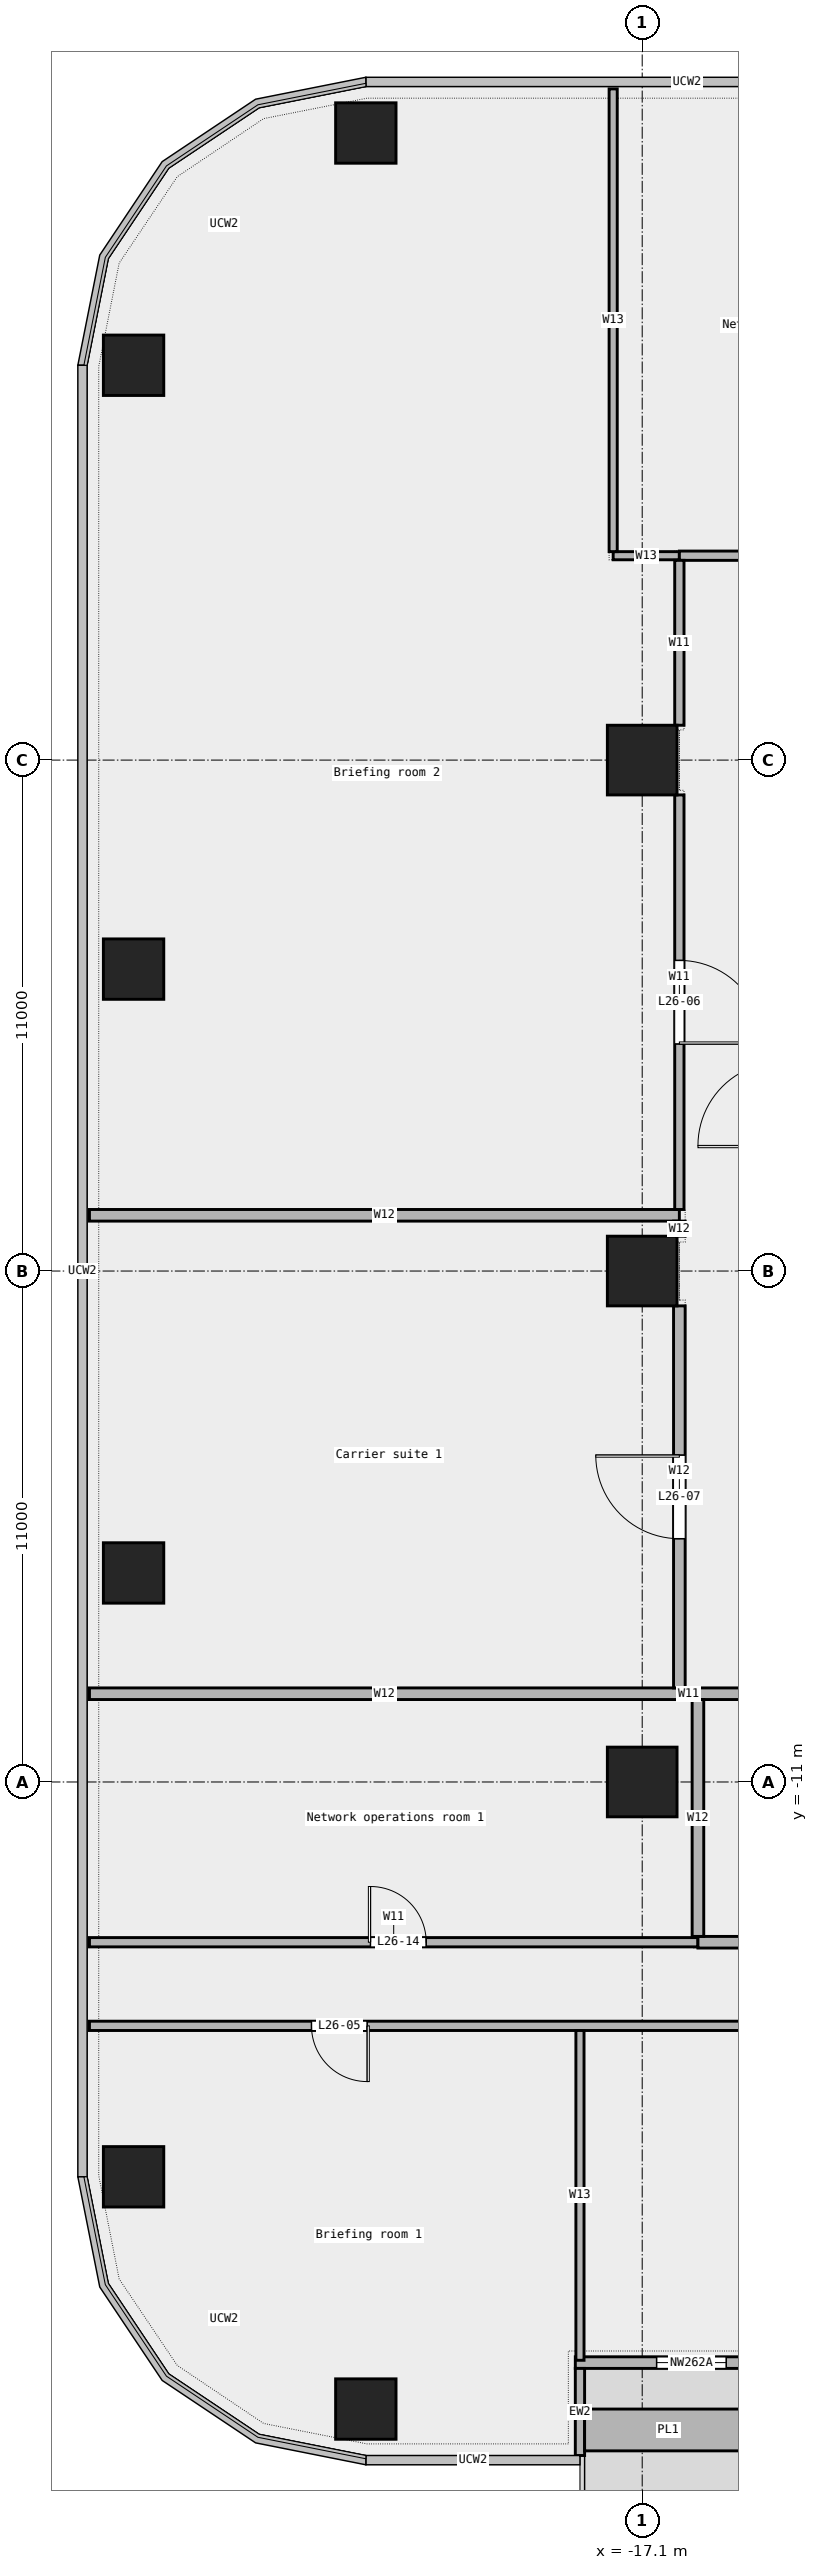
"""IFC4 building model, lengths in metres.
Left out: names, types, materials, properties, quantities, classifications, styles, units other than length and angle.
Written with IfcOpenShell. Run it as: python <this file> out.ifc"""

import sys

from ifc_helpers import new_model, si_unit, direction, frame, frame_2d, origin, origin_2d, place, context, subcontext, project, spatial, rectangle, extrude, element, fill, save


model = new_model("IFC4")
c1 = context("Model", 3, precision=1e-05, world=origin(), true_north=direction((0.0, 1.0)))
c2 = subcontext(c1, "Body", "Model", "MODEL_VIEW")
j1 = project(units=[si_unit("LENGTHUNIT", "METRE"), si_unit("PLANEANGLEUNIT", "RADIAN")], contexts=[c1])
p1 = place(None, origin())
s1 = spatial("IfcSite", under=j1, at=p1, CompositionType="ELEMENT")
p2 = place(p1, origin())
s2 = spatial("IfcBuilding", under=s1, at=p2, CompositionType="ELEMENT")
p3 = place(p2, frame((0.0, 0.0, 130.6)))
s3 = spatial("IfcBuildingStorey", under=s2, at=p3, CompositionType="ELEMENT", Elevation=130.6)
for number, where, z_axis, x_axis in (
    (1, (-23.05, -24.5, 0.0), (0.0, 0.0, 1.0), (1.0, 0.0, 0.0)),
    (2, (-23.05, 24.5, 0.0), (0.0, 0.0, 1.0), (1.0, 0.0, 0.0)),
    (3, (-28.05, 19.5, 0.0), (0.0, 0.0, 1.0), (1.0, 0.0, 0.0)),
    (4, (-28.05, 6.5, 0.0), (0.0, 0.0, 1.0), (1.0, 0.0, 0.0)),
    (5, (-28.05, -6.5, 0.0), (0.0, 0.0, 1.0), (1.0, 0.0, 0.0)),
    (6, (-28.05, -19.5, 0.0), (0.0, 0.0, 1.0), (1.0, 0.0, 0.0)),
):
    element("IfcColumn", number, at=place(p3, frame(where, z_axis=z_axis, x_axis=x_axis)), inside=s3, PredefinedType="COLUMN", context=c2, shape_type="SweptSolid", body=[
        extrude(rectangle(XDim=1.3, YDim=1.3, at=origin_2d()), origin(), (0.0, 0.0, 1.0), 4.05),
    ])
for number, where, z_axis, x_axis in (
    (7, (-17.1, -11.0, 0.0), (0.0, 0.0, 1.0), (1.0, 0.0, 0.0)),
    (8, (-17.1, 0.0, 0.0), (0.0, 0.0, 1.0), (1.0, 0.0, 0.0)),
    (9, (-17.1, 11.0, 0.0), (0.0, 0.0, 1.0), (1.0, 0.0, 0.0)),
):
    element("IfcColumn", number, at=place(p3, frame(where, z_axis=z_axis, x_axis=x_axis)), inside=s3, PredefinedType="COLUMN", context=c2, shape_type="SweptSolid", body=[
        extrude(rectangle(XDim=1.5, YDim=1.5, at=origin_2d()), origin(), (0.0, 0.0, 1.0), 4.05),
    ])
p4 = place(p3, frame((-18.54, -23.5, 0.0), z_axis=(0.0, 0.0, 1.0), x_axis=(1.0, 0.0, 0.0)))
e10 = element("IfcWall", 10, at=p4, inside=s3, PredefinedType="STANDARD", context=c2, shape_type="SweptSolid", body=[
    extrude(rectangle(XDim=14.03, YDim=0.25, at=frame_2d((7.015, 0.0))), origin(), (0.0, 0.0, 1.0), 4.05),
])
p5 = place(p4, frame((1.75, 0.0, 0.45)))
e11 = element("IfcOpeningElement", 11, at=p5, cuts=e10, PredefinedType="OPENING", context=c2, shape_type="SweptSolid", body=[
    extrude(rectangle(XDim=1.5, YDim=3.0, at=frame_2d((0.75, 1.5))), frame((0.0, 0.137, 0.0), z_axis=(0.0, -1.0, 0.0), x_axis=(1.0, 0.0, 0.0)), (0.0, 0.0, 1.0), 0.274),
])
p6 = place(p4, frame((4.25, 0.0, 0.0)))
e12 = element("IfcOpeningElement", 12, at=p6, cuts=e10, PredefinedType="OPENING", context=c2, shape_type="SweptSolid", body=[
    extrude(rectangle(XDim=1.8, YDim=2.4, at=frame_2d((0.9, 1.2))), frame((0.0, 0.137, 0.0), z_axis=(0.0, -1.0, 0.0), x_axis=(1.0, 0.0, 0.0)), (0.0, 0.0, 1.0), 0.274),
])
p7 = place(p4, frame((10.75, 0.0, 0.45)))
e13 = element("IfcOpeningElement", 13, at=p7, cuts=e10, PredefinedType="OPENING", context=c2, shape_type="SweptSolid", body=[
    extrude(rectangle(XDim=1.5, YDim=3.0, at=frame_2d((0.75, 1.5))), frame((0.0, 0.137, 0.0), z_axis=(0.0, -1.0, 0.0), x_axis=(1.0, 0.0, 0.0)), (0.0, 0.0, 1.0), 0.274),
])
p8 = place(p3, frame((-18.44, -25.5, 0.0), z_axis=(0.0, 0.0, 1.0), x_axis=(0.0, 1.0, 0.0)))
e14 = element("IfcWall", 14, at=p8, inside=s3, PredefinedType="STANDARD", context=c2, shape_type="SweptSolid", body=[
    extrude(rectangle(XDim=1.875, YDim=0.2, at=frame_2d((0.938, 0.0))), origin(), (0.0, 0.0, 1.0), 4.05),
])
p9 = place(p3, frame((-18.34, -24.95, 0.0), z_axis=(0.0, 0.0, 1.0), x_axis=(1.0, 0.0, 0.0)))
e15 = element("IfcWall", 15, at=p9, inside=s3, PredefinedType="STANDARD", context=c2, shape_type="SweptSolid", body=[
    extrude(rectangle(XDim=3.6, YDim=0.9, at=frame_2d((1.8, 0.0))), origin(), (0.0, 0.0, 1.0), 0.7),
])
p10 = place(p3, frame((-29.0, -16.25, 0.0), z_axis=(0.0, 0.0, 1.0), x_axis=(1.0, 0.0, 0.0)))
e16 = element("IfcWall", 16, at=p10, inside=s3, PredefinedType="PARTITIONING", context=c2, shape_type="SweptSolid", body=[
    extrude(rectangle(XDim=58.0, YDim=0.2, at=frame_2d((29.0, 0.0))), origin(), (0.0, 0.0, 1.0), 4.05),
])
p11 = place(p10, frame((16.725, 0.0, 0.0)))
e17 = element("IfcOpeningElement", 17, at=p11, cuts=e16, PredefinedType="OPENING", context=c2, shape_type="SweptSolid", body=[
    extrude(rectangle(XDim=1.5, YDim=2.1, at=frame_2d((0.75, 1.05))), frame((0.0, 0.112, 0.0), z_axis=(0.0, -1.0, 0.0), x_axis=(1.0, 0.0, 0.0)), (0.0, 0.0, 1.0), 0.224),
])
p12 = place(p10, frame((4.78, 0.0, 0.0)))
e18 = element("IfcOpeningElement", 18, at=p12, cuts=e16, PredefinedType="OPENING", context=c2, shape_type="SweptSolid", body=[
    extrude(rectangle(XDim=1.2, YDim=2.1, at=frame_2d((0.6, 1.05))), frame((0.0, 0.112, 0.0), z_axis=(0.0, -1.0, 0.0), x_axis=(1.0, 0.0, 0.0)), (0.0, 0.0, 1.0), 0.224),
])
p13 = place(p10, frame((40.195, 0.0, 0.0)))
e19 = element("IfcOpeningElement", 19, at=p13, cuts=e16, PredefinedType="OPENING", context=c2, shape_type="SweptSolid", body=[
    extrude(rectangle(XDim=1.8, YDim=2.1, at=frame_2d((0.9, 1.05))), frame((0.0, 0.112, 0.0), z_axis=(0.0, -1.0, 0.0), x_axis=(1.0, 0.0, 0.0)), (0.0, 0.0, 1.0), 0.224),
])
p14 = place(p3, frame((-29.0, -14.45, 0.0), z_axis=(0.0, 0.0, 1.0), x_axis=(1.0, 0.0, 0.0)))
e20 = element("IfcWall", 20, at=p14, inside=s3, PredefinedType="PARTITIONING", context=c2, shape_type="SweptSolid", body=[
    extrude(rectangle(XDim=13.1, YDim=0.2, at=frame_2d((6.55, 0.0))), origin(), (0.0, 0.0, 1.0), 4.05),
])
p15 = place(p14, frame((6.05, 0.0, 0.0)))
e21 = element("IfcOpeningElement", 21, at=p15, cuts=e20, PredefinedType="OPENING", context=c2, shape_type="SweptSolid", body=[
    extrude(rectangle(XDim=1.2, YDim=2.1, at=frame_2d((0.6, 1.05))), frame((0.0, 0.112, 0.0), z_axis=(0.0, -1.0, 0.0), x_axis=(1.0, 0.0, 0.0)), (0.0, 0.0, 1.0), 0.224),
])
p16 = place(p3, frame((-15.9, -14.45, 0.0), z_axis=(0.0, 0.0, 1.0), x_axis=(1.0, 0.0, 0.0)))
e22 = element("IfcWall", 22, at=p16, inside=s3, PredefinedType="PARTITIONING", context=c2, shape_type="SweptSolid", body=[
    extrude(rectangle(XDim=6.935, YDim=0.25, at=frame_2d((3.467, 0.0))), origin(), (0.0, 0.0, 1.0), 4.05),
])
p17 = place(p3, frame((-16.3, -9.1, 0.0), z_axis=(0.0, 0.0, 1.0), x_axis=(1.0, 0.0, 0.0)))
e23 = element("IfcWall", 23, at=p17, inside=s3, PredefinedType="PARTITIONING", context=c2, shape_type="SweptSolid", body=[
    extrude(rectangle(XDim=0.4, YDim=0.2, at=frame_2d((0.2, 0.0))), origin(), (0.0, 0.0, 1.0), 4.05),
])
p18 = place(p3, frame((-29.0, -9.1, 0.0), z_axis=(0.0, 0.0, 1.0), x_axis=(1.0, 0.0, 0.0)))
e24 = element("IfcWall", 24, at=p18, inside=s3, PredefinedType="PARTITIONING", context=c2, shape_type="SweptSolid", body=[
    extrude(rectangle(XDim=12.7, YDim=0.25, at=frame_2d((6.35, 0.0))), origin(), (0.0, 0.0, 1.0), 4.05),
])
p19 = place(p3, frame((-15.9, -9.1, 0.0), z_axis=(0.0, 0.0, 1.0), x_axis=(1.0, 0.0, 0.0)))
e25 = element("IfcWall", 25, at=p19, inside=s3, PredefinedType="PARTITIONING", context=c2, shape_type="SweptSolid", body=[
    extrude(rectangle(XDim=6.935, YDim=0.25, at=frame_2d((3.467, 0.0))), origin(), (0.0, 0.0, 1.0), 4.05),
])
p20 = place(p19, frame((3.018, 0.0, 0.0)))
e26 = element("IfcOpeningElement", 26, at=p20, cuts=e25, PredefinedType="OPENING", context=c2, shape_type="SweptSolid", body=[
    extrude(rectangle(XDim=0.9, YDim=2.1, at=frame_2d((0.45, 1.05))), frame((0.0, 0.137, 0.0), z_axis=(0.0, -1.0, 0.0), x_axis=(1.0, 0.0, 0.0)), (0.0, 0.0, 1.0), 0.274),
])
p21 = place(p3, frame((-29.0, 1.2, 0.0), z_axis=(0.0, 0.0, 1.0), x_axis=(1.0, 0.0, 0.0)))
e27 = element("IfcWall", 27, at=p21, inside=s3, PredefinedType="PARTITIONING", context=c2, shape_type="SweptSolid", body=[
    extrude(rectangle(XDim=12.7, YDim=0.25, at=frame_2d((6.35, 0.0))), origin(), (0.0, 0.0, 1.0), 4.05),
])
p22 = place(p3, frame((-17.725, 15.4, 0.0), z_axis=(0.0, 0.0, 1.0), x_axis=(1.0, 0.0, 0.0)))
e28 = element("IfcWall", 28, at=p22, inside=s3, PredefinedType="PARTITIONING", context=c2, shape_type="SweptSolid", body=[
    extrude(rectangle(XDim=1.425, YDim=0.175, at=frame_2d((0.712, 0.0))), origin(), (0.0, 0.0, 1.0), 4.05),
])
p23 = place(p3, frame((-16.3, 15.4, 0.0), z_axis=(0.0, 0.0, 1.0), x_axis=(1.0, 0.0, 0.0)))
e29 = element("IfcWall", 29, at=p23, inside=s3, PredefinedType="PARTITIONING", context=c2, shape_type="SweptSolid", body=[
    extrude(rectangle(XDim=20.91, YDim=0.2, at=frame_2d((10.455, 0.0))), origin(), (0.0, 0.0, 1.0), 4.05),
])
p24 = place(p23, frame((13.245, 0.0, 0.0)))
e30 = element("IfcOpeningElement", 30, at=p24, cuts=e29, PredefinedType="OPENING", context=c2, shape_type="SweptSolid", body=[
    extrude(rectangle(XDim=1.5, YDim=2.1, at=frame_2d((0.75, 1.05))), frame((0.0, 0.112, 0.0), z_axis=(0.0, -1.0, 0.0), x_axis=(1.0, 0.0, 0.0)), (0.0, 0.0, 1.0), 0.224),
])
p25 = place(p23, frame((2.387, 0.0, 0.0)))
e31 = element("IfcOpeningElement", 31, at=p25, cuts=e29, PredefinedType="OPENING", context=c2, shape_type="SweptSolid", body=[
    extrude(rectangle(XDim=1.2, YDim=2.1, at=frame_2d((0.6, 1.05))), frame((0.0, 0.112, 0.0), z_axis=(0.0, -1.0, 0.0), x_axis=(1.0, 0.0, 0.0)), (0.0, 0.0, 1.0), 0.224),
])
p26 = place(p3, frame((-18.44, -23.45, 0.0), z_axis=(0.0, 0.0, 1.0), x_axis=(0.0, 1.0, 0.0)))
e32 = element("IfcWall", 32, at=p26, inside=s3, PredefinedType="PARTITIONING", context=c2, shape_type="SweptSolid", body=[
    extrude(rectangle(XDim=7.1, YDim=0.175, at=frame_2d((3.55, 0.0))), origin(), (0.0, 0.0, 1.0), 4.05),
])
p27 = place(p3, frame((-17.725, 15.488, 0.0), z_axis=(0.0, 0.0, 1.0), x_axis=(0.0, 1.0, 0.0)))
e33 = element("IfcWall", 33, at=p27, inside=s3, PredefinedType="PARTITIONING", context=c2, shape_type="SweptSolid", body=[
    extrude(rectangle(XDim=9.962, YDim=0.175, at=frame_2d((4.981, 0.0))), origin(), (0.0, 0.0, 1.0), 4.05),
])
p28 = place(p3, frame((-16.3, 1.325, 0.0), z_axis=(0.0, 0.0, 1.0), x_axis=(0.0, 1.0, 0.0)))
e34 = element("IfcWall", 34, at=p28, inside=s3, PredefinedType="PARTITIONING", context=c2, shape_type="SweptSolid", body=[
    extrude(rectangle(XDim=8.925, YDim=0.2, at=frame_2d((4.462, 0.0))), origin(), (0.0, 0.0, 1.0), 4.05),
])
p29 = place(p28, frame((3.562, 0.0, 0.0)))
e35 = element("IfcOpeningElement", 35, at=p29, cuts=e34, PredefinedType="OPENING", context=c2, shape_type="SweptSolid", body=[
    extrude(rectangle(XDim=1.8, YDim=2.1, at=frame_2d((0.9, 1.05))), frame((0.0, 0.112, 0.0), z_axis=(0.0, -1.0, 0.0), x_axis=(1.0, 0.0, 0.0)), (0.0, 0.0, 1.0), 0.224),
])
p30 = place(p3, frame((-16.3, 11.75, 0.0), z_axis=(0.0, 0.0, 1.0), x_axis=(0.0, 1.0, 0.0)))
e36 = element("IfcWall", 36, at=p30, inside=s3, PredefinedType="PARTITIONING", context=c2, shape_type="SweptSolid", body=[
    extrude(rectangle(XDim=3.55, YDim=0.2, at=frame_2d((1.775, 0.0))), origin(), (0.0, 0.0, 1.0), 4.05),
])
p31 = place(p3, frame((-16.3, -8.975, 0.0), z_axis=(0.0, 0.0, 1.0), x_axis=(0.0, 1.0, 0.0)))
e37 = element("IfcWall", 37, at=p31, inside=s3, PredefinedType="PARTITIONING", context=c2, shape_type="SweptSolid", body=[
    extrude(rectangle(XDim=8.225, YDim=0.25, at=frame_2d((4.113, 0.0))), origin(), (0.0, 0.0, 1.0), 4.05),
])
p32 = place(p31, frame((3.212, 0.0, 0.0)))
e38 = element("IfcOpeningElement", 38, at=p32, cuts=e37, PredefinedType="OPENING", context=c2, shape_type="SweptSolid", body=[
    extrude(rectangle(XDim=1.8, YDim=2.1, at=frame_2d((0.9, 1.05))), frame((0.0, 0.137, 0.0), z_axis=(0.0, -1.0, 0.0), x_axis=(1.0, 0.0, 0.0)), (0.0, 0.0, 1.0), 0.274),
])
p33 = place(p3, frame((-16.3, 0.75, 0.0), z_axis=(0.0, 0.0, 1.0), x_axis=(0.0, 1.0, 0.0)))
e39 = element("IfcWall", 39, at=p33, inside=s3, PredefinedType="PARTITIONING", context=c2, shape_type="SweptSolid", body=[
    extrude(rectangle(XDim=0.325, YDim=0.25, at=frame_2d((0.163, 0.0))), origin(), (0.0, 0.0, 1.0), 4.05),
])
p34 = place(p3, frame((-15.9, -14.325, 0.0), z_axis=(0.0, 0.0, 1.0), x_axis=(0.0, 1.0, 0.0)))
e40 = element("IfcWall", 40, at=p34, inside=s3, PredefinedType="PARTITIONING", context=c2, shape_type="SweptSolid", body=[
    extrude(rectangle(XDim=5.1, YDim=0.25, at=frame_2d((2.55, 0.0))), origin(), (0.0, 0.0, 1.0), 4.05),
])
p35 = place(p5, origin())
e41 = element("IfcWindow", 41, at=p35, inside=s3, PartitioningType="SINGLE_PANEL", PredefinedType="WINDOW", context=c2, shape_type="SweptSolid", body=[
    extrude(rectangle(XDim=1.5, YDim=3.0, at=frame_2d((0.75, 1.5))), frame((0.0, 0.03, 0.0), z_axis=(0.0, -1.0, 0.0), x_axis=(1.0, 0.0, 0.0)), (0.0, 0.0, 1.0), 0.06),
])
fill(e11, e41)
p36 = place(p12, origin())
e42 = element("IfcDoor", 42, at=p36, inside=s3, OperationType="SINGLE_SWING_LEFT", PredefinedType="DOOR", context=c2, shape_type="SweptSolid", body=[
    extrude(rectangle(XDim=1.2, YDim=2.1, at=frame_2d((0.6, 1.05))), frame((0.0, 0.025, 0.0), z_axis=(0.0, -1.0, 0.0), x_axis=(1.0, 0.0, 0.0)), (0.0, 0.0, 1.0), 0.05),
])
fill(e18, e42)
p37 = place(p29, origin())
e43 = element("IfcDoor", 43, at=p37, inside=s3, OperationType="DOUBLE_DOOR_SINGLE_SWING", PredefinedType="DOOR", context=c2, shape_type="SweptSolid", body=[
    extrude(rectangle(XDim=1.8, YDim=2.1, at=frame_2d((0.9, 1.05))), frame((0.0, 0.025, 0.0), z_axis=(0.0, -1.0, 0.0), x_axis=(1.0, 0.0, 0.0)), (0.0, 0.0, 1.0), 0.05),
])
fill(e35, e43)
p38 = place(p32, origin())
e44 = element("IfcDoor", 44, at=p38, inside=s3, OperationType="DOUBLE_DOOR_SINGLE_SWING", PredefinedType="DOOR", context=c2, shape_type="SweptSolid", body=[
    extrude(rectangle(XDim=1.8, YDim=2.1, at=frame_2d((0.9, 1.05))), frame((0.0, 0.025, 0.0), z_axis=(0.0, -1.0, 0.0), x_axis=(1.0, 0.0, 0.0)), (0.0, 0.0, 1.0), 0.05),
])
fill(e38, e44)
p39 = place(p15, origin())
e45 = element("IfcDoor", 45, at=p39, inside=s3, OperationType="SINGLE_SWING_LEFT", PredefinedType="DOOR", context=c2, shape_type="SweptSolid", body=[
    extrude(rectangle(XDim=1.2, YDim=2.1, at=frame_2d((0.6, 1.05))), frame((0.0, 0.025, 0.0), z_axis=(0.0, -1.0, 0.0), x_axis=(1.0, 0.0, 0.0)), (0.0, 0.0, 1.0), 0.05),
])
fill(e21, e45)
save(model, sys.argv[1])
